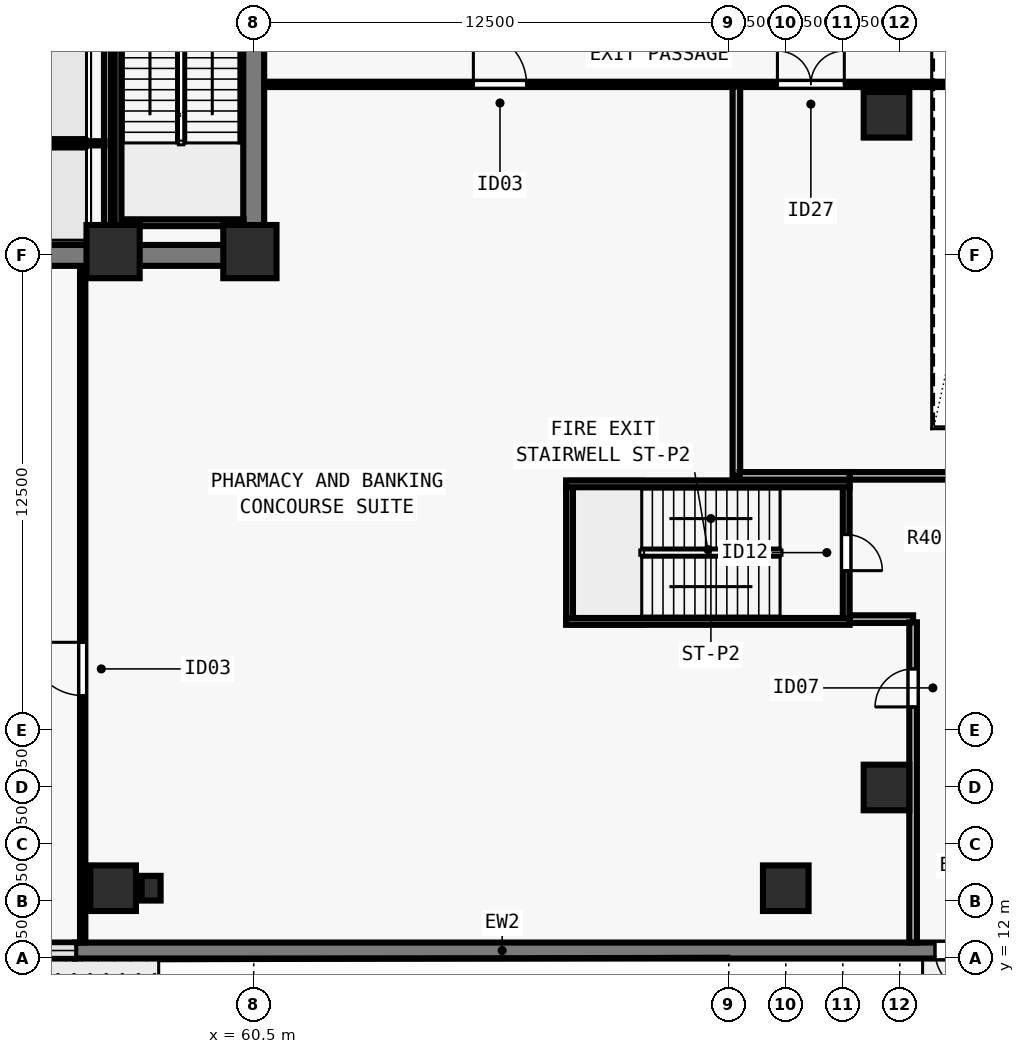
"""IFC4 building model, lengths in metres.
Left out: names, types, materials, properties, quantities, classifications, styles, units other than length and angle.
Written with IfcOpenShell. Run it as: python <this file> out.ifc"""

import sys

from ifc_helpers import new_model, si_unit, direction, frame, frame_2d, origin, origin_2d, place, context, subcontext, project, spatial, rectangle, extrude, element, fill, save


model = new_model("IFC4")
c1 = context("Model", 3, precision=1e-05, world=origin(), true_north=direction((0.0, 1.0)))
c2 = subcontext(c1, "Body", "Model", "MODEL_VIEW")
j1 = project(units=[si_unit("LENGTHUNIT", "METRE"), si_unit("PLANEANGLEUNIT", "RADIAN")], contexts=[c1])
p1 = place(None, origin())
s1 = spatial("IfcSite", under=j1, at=p1, CompositionType="ELEMENT")
p2 = place(p1, origin())
s2 = spatial("IfcBuilding", under=s1, at=p2, CompositionType="ELEMENT")
p3 = place(p2, origin())
s3 = spatial("IfcBuildingStorey", under=s2, at=p3, CompositionType="ELEMENT", Elevation=0.0)
for number, where, z_axis, x_axis in (
    (1, (56.8, 30.6, 0.0), (0.0, 0.0, 1.0), (1.0, 0.0, 0.0)),
    (2, (60.4, 30.6, 0.0), (0.0, 0.0, 1.0), (1.0, 0.0, 0.0)),
):
    element("IfcColumn", number, at=place(p3, frame(where, z_axis=z_axis, x_axis=x_axis)), inside=s3, PredefinedType="COLUMN", context=c2, shape_type="SweptSolid", body=[
        extrude(rectangle(XDim=1.4, YDim=1.4, at=origin_2d()), origin(), (0.0, 0.0, 1.0), 5.0),
    ])
for number, where, z_axis, x_axis in (
    (3, (56.8, 13.85, 0.0), (0.0, 0.0, 1.0), (1.0, 0.0, 0.0)),
    (4, (74.5, 13.85, 0.0), (0.0, 0.0, 1.0), (1.0, 0.0, 0.0)),
    (5, (77.15, 16.5, 0.0), (0.0, 0.0, 1.0), (1.0, 0.0, 0.0)),
    (6, (77.15, 34.2, 0.0), (0.0, 0.0, 1.0), (1.0, 0.0, 0.0)),
):
    element("IfcColumn", number, at=place(p3, frame(where, z_axis=z_axis, x_axis=x_axis)), inside=s3, PredefinedType="COLUMN", context=c2, shape_type="SweptSolid", body=[
        extrude(rectangle(XDim=1.2, YDim=1.2, at=origin_2d()), origin(), (0.0, 0.0, 1.0), 5.0),
    ])
p4 = place(p3, frame((57.8, 13.85, 0.0), z_axis=(0.0, 0.0, 1.0), x_axis=(1.0, 0.0, 0.0)))
e7 = element("IfcColumn", 7, at=p4, inside=s3, PredefinedType="PILASTER", context=c2, shape_type="SweptSolid", body=[
    extrude(rectangle(XDim=0.5, YDim=0.65, at=origin_2d()), origin(), (0.0, 0.0, 1.0), 5.0),
])
p5 = place(p3, frame((86.0, 12.21, 0.0), z_axis=(0.0, 0.0, 1.0), x_axis=(-1.0, 0.0, 0.0)))
e8 = element("IfcWall", 8, at=p5, inside=s3, PredefinedType="SOLIDWALL", context=c2, shape_type="SweptSolid", body=[
    extrude(rectangle(XDim=30.2, YDim=0.42, at=frame_2d((15.1, 0.0))), origin(), (0.0, 0.0, 1.0), 4.7),
])
p6 = place(p5, frame((6.425, 0.0, 0.0)))
e9 = element("IfcOpeningElement", 9, at=p6, cuts=e8, PredefinedType="OPENING", context=c2, shape_type="SweptSolid", body=[
    extrude(rectangle(XDim=1.15, YDim=2.15, at=frame_2d((0.575, 1.075))), frame((0.0, 0.22, 0.0), z_axis=(0.0, -1.0, 0.0), x_axis=(1.0, 0.0, 0.0)), (0.0, 0.0, 1.0), 0.44),
])
p7 = place(p3, frame((55.8, 12.21, 0.0), z_axis=(0.0, 0.0, 1.0), x_axis=(-1.0, 0.0, 0.0)))
e10 = element("IfcWall", 10, at=p7, inside=s3, PredefinedType="SOLIDWALL", context=c2, shape_type="SweptSolid", body=[
    extrude(rectangle(XDim=7.6, YDim=0.42, at=frame_2d((3.8, 0.0))), origin(), (0.0, 0.0, 1.0), 2.85),
])
p8 = place(p7, frame((2.6, 0.0, 0.0)))
e11 = element("IfcOpeningElement", 11, at=p8, cuts=e10, PredefinedType="OPENING", context=c2, shape_type="SweptSolid", body=[
    extrude(rectangle(XDim=2.4, YDim=2.7, at=frame_2d((1.2, 1.35))), frame((0.0, 0.22, 0.0), z_axis=(0.0, -1.0, 0.0), x_axis=(1.0, 0.0, 0.0)), (0.0, 0.0, 1.0), 0.44),
])
p9 = place(p3, frame((43.225, 30.5, 0.0), z_axis=(0.0, 0.0, 1.0), x_axis=(1.0, 0.0, 0.0)))
e12 = element("IfcWall", 12, at=p9, inside=s3, PredefinedType="SHEAR", context=c2, shape_type="SweptSolid", body=[
    extrude(rectangle(XDim=17.55, YDim=0.55, at=frame_2d((8.775, 0.0))), origin(), (0.0, 0.0, 1.0), 4.7),
])
p10 = place(p3, frame((60.5, 30.765, 0.0), z_axis=(0.0, 0.0, 1.0), x_axis=(0.0, 1.0, 0.0)))
e13 = element("IfcWall", 13, at=p10, inside=s3, PredefinedType="SHEAR", context=c2, shape_type="SweptSolid", body=[
    extrude(rectangle(XDim=7.985, YDim=0.55, at=frame_2d((3.993, 0.0))), origin(), (0.0, 0.0, 1.0), 4.7),
])
p11 = place(p3, frame((56.65, 30.76, 0.0), z_axis=(0.0, 0.0, 1.0), x_axis=(0.0, 1.0, 0.0)))
e14 = element("IfcWall", 14, at=p11, inside=s3, PredefinedType="SOLIDWALL", context=c2, shape_type="SweptSolid", body=[
    extrude(rectangle(XDim=7.855, YDim=0.18, at=frame_2d((3.927, 0.0))), origin(), (0.0, 0.0, 1.0), 4.7),
])
p12 = place(p3, frame((53.785, 33.45, 0.0), z_axis=(0.0, 0.0, 1.0), x_axis=(1.0, 0.0, 0.0)))
e15 = element("IfcWall", 15, at=p12, inside=s3, PredefinedType="PARTITIONING", context=c2, shape_type="SweptSolid", body=[
    extrude(rectangle(XDim=2.79, YDim=0.11, at=frame_2d((1.395, 0.0))), origin(), (0.0, 0.0, 1.0), 4.7),
])
p13 = place(p3, frame((56.0, 12.42, 0.0), z_axis=(0.0, 0.0, 1.0), x_axis=(0.0, 1.0, 0.0)))
e16 = element("IfcWall", 16, at=p13, inside=s3, PredefinedType="PARTITIONING", context=c2, shape_type="SweptSolid", body=[
    extrude(rectangle(XDim=17.8, YDim=0.14, at=frame_2d((8.9, 0.0))), origin(), (0.0, 0.0, 1.0), 4.7),
])
p14 = place(p13, frame((6.5, 0.0, 0.0)))
e17 = element("IfcOpeningElement", 17, at=p14, cuts=e16, PredefinedType="OPENING", context=c2, shape_type="SweptSolid", body=[
    extrude(rectangle(XDim=1.4, YDim=2.2, at=frame_2d((0.7, 1.1))), frame((0.0, 0.08, 0.0), z_axis=(0.0, -1.0, 0.0), x_axis=(1.0, 0.0, 0.0)), (0.0, 0.0, 1.0), 0.16),
])
p15 = place(p3, frame((60.78, 35.0, 0.0), z_axis=(0.0, 0.0, 1.0), x_axis=(1.0, 0.0, 0.0)))
e18 = element("IfcWall", 18, at=p15, inside=s3, PredefinedType="PARTITIONING", context=c2, shape_type="SweptSolid", body=[
    extrude(rectangle(XDim=24.8, YDim=0.14, at=frame_2d((12.4, 0.0))), origin(), (0.0, 0.0, 1.0), 4.7),
])
p16 = place(p15, frame((5.5, 0.0, 0.0)))
e19 = element("IfcOpeningElement", 19, at=p16, cuts=e18, PredefinedType="OPENING", context=c2, shape_type="SweptSolid", body=[
    extrude(rectangle(XDim=1.4, YDim=2.2, at=frame_2d((0.7, 1.1))), frame((0.0, 0.08, 0.0), z_axis=(0.0, -1.0, 0.0), x_axis=(1.0, 0.0, 0.0)), (0.0, 0.0, 1.0), 0.16),
])
p17 = place(p15, frame((13.5, 0.0, 0.0)))
e20 = element("IfcOpeningElement", 20, at=p17, cuts=e18, PredefinedType="OPENING", context=c2, shape_type="SweptSolid", body=[
    extrude(rectangle(XDim=1.76, YDim=2.2, at=frame_2d((0.88, 1.1))), frame((0.0, 0.08, 0.0), z_axis=(0.0, -1.0, 0.0), x_axis=(1.0, 0.0, 0.0)), (0.0, 0.0, 1.0), 0.16),
])
p18 = place(p3, frame((76.18, 20.93, 0.0), z_axis=(0.0, 0.0, 1.0), x_axis=(1.0, 0.0, 0.0)))
e21 = element("IfcWall", 21, at=p18, inside=s3, PredefinedType="SOLIDWALL", context=c2, shape_type="SweptSolid", body=[
    extrude(rectangle(XDim=1.67, YDim=0.2, at=frame_2d((0.835, 0.0))), origin(), (0.0, 0.0, 1.0), 4.7),
])
p19 = place(p3, frame((77.85, 12.42, 0.0), z_axis=(0.0, 0.0, 1.0), x_axis=(0.0, 1.0, 0.0)))
e22 = element("IfcWall", 22, at=p19, inside=s3, PredefinedType="SOLIDWALL", context=c2, shape_type="SweptSolid", body=[
    extrude(rectangle(XDim=8.425, YDim=0.2, at=frame_2d((4.212, 0.0))), origin(), (0.0, 0.0, 1.0), 4.7),
])
p20 = place(p19, frame((6.2, 0.0, 0.0)))
e23 = element("IfcOpeningElement", 23, at=p20, cuts=e22, PredefinedType="OPENING", context=c2, shape_type="SweptSolid", body=[
    extrude(rectangle(XDim=1.0, YDim=2.15, at=frame_2d((0.5, 1.075))), frame((0.0, 0.11, 0.0), z_axis=(0.0, -1.0, 0.0), x_axis=(1.0, 0.0, 0.0)), (0.0, 0.0, 1.0), 0.22),
])
p21 = place(p3, frame((76.18, 24.7, 0.0), z_axis=(0.0, 0.0, 1.0), x_axis=(1.0, 0.0, 0.0)))
e24 = element("IfcWall", 24, at=p21, inside=s3, PredefinedType="SOLIDWALL", context=c2, shape_type="SweptSolid", body=[
    extrude(rectangle(XDim=3.935, YDim=0.2, at=frame_2d((1.968, 0.0))), origin(), (0.0, 0.0, 1.0), 4.7),
])
p22 = place(p3, frame((73.2, 24.7, 0.0), z_axis=(0.0, 0.0, 1.0), x_axis=(0.0, 1.0, 0.0)))
e25 = element("IfcWall", 25, at=p22, inside=s3, PredefinedType="SOLIDWALL", context=c2, shape_type="SweptSolid", body=[
    extrude(rectangle(XDim=10.245, YDim=0.2, at=frame_2d((5.123, 0.0))), origin(), (0.0, 0.0, 1.0), 4.7),
])
p23 = place(p3, frame((73.285, 24.7, 0.0), z_axis=(0.0, 0.0, 1.0), x_axis=(1.0, 0.0, 0.0)))
e26 = element("IfcWall", 26, at=p23, inside=s3, PredefinedType="SOLIDWALL", context=c2, shape_type="SweptSolid", body=[
    extrude(rectangle(XDim=2.895, YDim=0.2, at=frame_2d((1.448, 0.0))), origin(), (0.0, 0.0, 1.0), 4.7),
])
p24 = place(p3, frame((57.005, 31.36, 0.0), z_axis=(0.0, 0.0, 1.0), x_axis=(1.0, 0.0, 0.0)))
e27 = element("IfcWall", 27, at=p24, inside=s3, PredefinedType="SOLIDWALL", context=c2, shape_type="SweptSolid", body=[
    extrude(rectangle(XDim=3.23, YDim=0.18, at=frame_2d((1.615, 0.0))), origin(), (0.0, 0.0, 1.0), 4.7),
])
p25 = place(p3, frame((56.93, 38.78, 0.0), z_axis=(0.0, 0.0, 1.0), x_axis=(0.0, -1.0, 0.0)))
e28 = element("IfcWall", 28, at=p25, inside=s3, PredefinedType="SOLIDWALL", context=c2, shape_type="SweptSolid", body=[
    extrude(rectangle(XDim=8.017, YDim=0.18, at=frame_2d((4.009, 0.0))), origin(), (0.0, 0.0, 1.0), 4.7),
])
p26 = place(p3, frame((76.09, 24.415, 0.0), z_axis=(0.0, 0.0, 1.0), x_axis=(0.0, -1.0, 0.0)))
e29 = element("IfcWall", 29, at=p26, inside=s3, PredefinedType="SOLIDWALL", context=c2, shape_type="SweptSolid", body=[
    extrude(rectangle(XDim=3.47, YDim=0.18, at=frame_2d((1.735, 0.0))), origin(), (0.0, 0.0, 1.0), 4.7),
])
p27 = place(p26, frame((1.26, 0.0, 0.0)))
e30 = element("IfcOpeningElement", 30, at=p27, cuts=e29, PredefinedType="OPENING", context=c2, shape_type="SweptSolid", body=[
    extrude(rectangle(XDim=0.95, YDim=2.15, at=frame_2d((0.475, 1.075))), frame((0.0, 0.1, 0.0), z_axis=(0.0, -1.0, 0.0), x_axis=(1.0, 0.0, 0.0)), (0.0, 0.0, 1.0), 0.2),
])
p28 = place(p3, frame((68.81, 24.415, 0.0), z_axis=(0.0, 0.0, 1.0), x_axis=(0.0, -1.0, 0.0)))
e31 = element("IfcWall", 31, at=p28, inside=s3, PredefinedType="SOLIDWALL", context=c2, shape_type="SweptSolid", body=[
    extrude(rectangle(XDim=3.47, YDim=0.18, at=frame_2d((1.735, 0.0))), origin(), (0.0, 0.0, 1.0), 4.7),
])
for number, where, z_axis, x_axis in (
    (32, (76.18, 24.49, 0.0), (0.0, 0.0, 1.0), (-1.0, 0.0, 0.0)),
    (33, (76.18, 20.87, 0.0), (0.0, 0.0, 1.0), (-1.0, 0.0, 0.0)),
):
    element("IfcWall", number, at=place(p3, frame(where, z_axis=z_axis, x_axis=x_axis)), inside=s3, PredefinedType="SOLIDWALL", context=c2, shape_type="SweptSolid", body=[
        extrude(rectangle(XDim=7.46, YDim=0.18, at=frame_2d((3.73, 0.0))), origin(), (0.0, 0.0, 1.0), 4.7),
    ])
p29 = place(p6, origin())
e34 = element("IfcDoor", 34, at=p29, inside=s3, OperationType="SINGLE_SWING_LEFT", PredefinedType="DOOR", context=c2, shape_type="SweptSolid", body=[
    extrude(rectangle(XDim=1.15, YDim=2.15, at=frame_2d((0.575, 1.075))), frame((0.0, 0.025, 0.0), z_axis=(0.0, -1.0, 0.0), x_axis=(1.0, 0.0, 0.0)), (0.0, 0.0, 1.0), 0.05),
])
fill(e9, e34)
p30 = place(p20, origin())
e35 = element("IfcDoor", 35, at=p30, inside=s3, OperationType="SINGLE_SWING_LEFT", PredefinedType="DOOR", context=c2, shape_type="SweptSolid", body=[
    extrude(rectangle(XDim=1.0, YDim=2.15, at=frame_2d((0.5, 1.075))), frame((0.0, 0.025, 0.0), z_axis=(0.0, -1.0, 0.0), x_axis=(1.0, 0.0, 0.0)), (0.0, 0.0, 1.0), 0.05),
])
fill(e23, e35)
p31 = place(p14, origin())
e36 = element("IfcDoor", 36, at=p31, inside=s3, OperationType="SINGLE_SWING_RIGHT", PredefinedType="DOOR", context=c2, shape_type="SweptSolid", body=[
    extrude(rectangle(XDim=1.4, YDim=2.2, at=frame_2d((0.7, 1.1))), frame((0.0, 0.025, 0.0), z_axis=(0.0, -1.0, 0.0), x_axis=(1.0, 0.0, 0.0)), (0.0, 0.0, 1.0), 0.05),
])
fill(e17, e36)
p32 = place(p16, origin())
e37 = element("IfcDoor", 37, at=p32, inside=s3, OperationType="SINGLE_SWING_LEFT", PredefinedType="DOOR", context=c2, shape_type="SweptSolid", body=[
    extrude(rectangle(XDim=1.4, YDim=2.2, at=frame_2d((0.7, 1.1))), frame((0.0, 0.025, 0.0), z_axis=(0.0, -1.0, 0.0), x_axis=(1.0, 0.0, 0.0)), (0.0, 0.0, 1.0), 0.05),
])
fill(e19, e37)
p33 = place(p17, origin())
e38 = element("IfcDoor", 38, at=p33, inside=s3, OperationType="DOUBLE_DOOR_SINGLE_SWING", PredefinedType="DOOR", context=c2, shape_type="SweptSolid", body=[
    extrude(rectangle(XDim=1.76, YDim=2.2, at=frame_2d((0.88, 1.1))), frame((0.0, 0.025, 0.0), z_axis=(0.0, -1.0, 0.0), x_axis=(1.0, 0.0, 0.0)), (0.0, 0.0, 1.0), 0.05),
])
fill(e20, e38)
p34 = place(p27, origin())
e39 = element("IfcDoor", 39, at=p34, inside=s3, OperationType="SINGLE_SWING_RIGHT", PredefinedType="DOOR", context=c2, shape_type="SweptSolid", body=[
    extrude(rectangle(XDim=0.95, YDim=2.15, at=frame_2d((0.475, 1.075))), frame((0.0, 0.025, 0.0), z_axis=(0.0, -1.0, 0.0), x_axis=(1.0, 0.0, 0.0)), (0.0, 0.0, 1.0), 0.05),
])
fill(e30, e39)
save(model, sys.argv[1])
